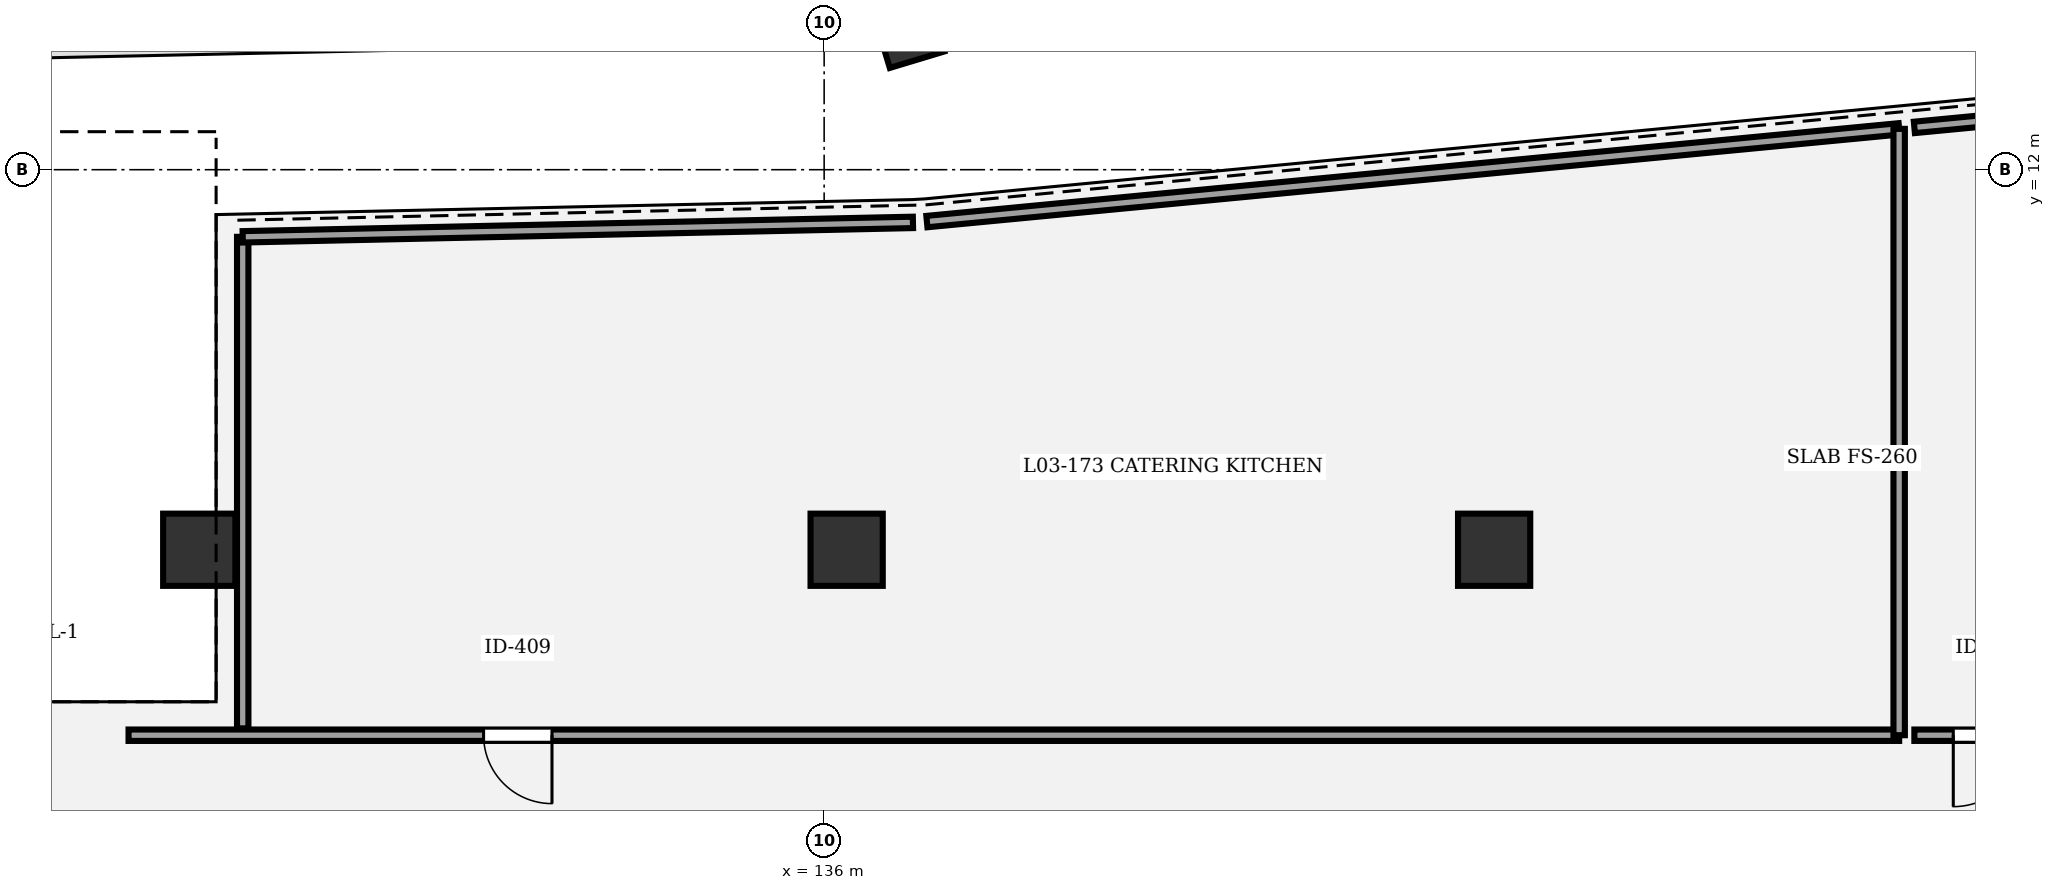
"""IFC4 building model, lengths in metres.
Left out: names, types, materials, properties, quantities, classifications, styles, units other than length and angle.
Written with IfcOpenShell. Run it as: python <this file> out.ifc"""

import sys

from ifc_helpers import new_model, si_unit, direction, frame, frame_2d, origin, origin_2d, place, context, subcontext, project, spatial, rectangle, circle, extrude, element, fill, save


model = new_model("IFC4")
c1 = context("Model", 3, precision=1e-05, world=origin(), true_north=direction((0.0, 1.0)))
c2 = subcontext(c1, "Body", "Model", "MODEL_VIEW")
j1 = project(units=[si_unit("LENGTHUNIT", "METRE"), si_unit("PLANEANGLEUNIT", "RADIAN")], contexts=[c1])
p1 = place(None, origin())
s1 = spatial("IfcSite", under=j1, at=p1, CompositionType="ELEMENT")
p2 = place(p1, origin())
s2 = spatial("IfcBuilding", under=s1, at=p2, CompositionType="ELEMENT")
p3 = place(p2, frame((0.0, 0.0, 14.7)))
s3 = spatial("IfcBuildingStorey", under=s2, at=p3, CompositionType="ELEMENT", Elevation=14.7)
p4 = place(p3, frame((137.115, 13.806, 0.0), z_axis=(0.0, 0.0, 1.0), x_axis=(0.289198876314, -0.957269037387, 0.0)))
e1 = element("IfcColumn", 1, at=p4, inside=s3, PredefinedType="COLUMN", context=c2, shape_type="SweptSolid", body=[
    extrude(rectangle(XDim=0.75, YDim=0.75, at=origin_2d()), origin(), (0.0, 0.0, 1.0), 4.5),
])
for number, where, z_axis, x_axis in (
    (2, (127.778, 7.0, 0.0), (0.0, 0.0, 1.0), (1.0, 0.0, 0.0)),
    (3, (136.296, 7.0, 0.0), (0.0, 0.0, 1.0), (1.0, 0.0, 0.0)),
    (4, (144.815, 7.0, 0.0), (0.0, 0.0, 1.0), (1.0, 0.0, 0.0)),
):
    element("IfcColumn", number, at=place(p3, frame(where, z_axis=z_axis, x_axis=x_axis)), inside=s3, PredefinedType="COLUMN", context=c2, shape_type="SweptSolid", body=[
        extrude(circle(Radius=0.475, at=origin_2d()), origin(), (0.0, 0.0, 1.0), 4.5),
    ])
p5 = place(p3, frame((150.144, 4.56, 0.0), z_axis=(0.0, 0.0, 1.0), x_axis=(-1.0, 0.0, 0.0)))
e5 = element("IfcWall", 5, at=p5, inside=s3, PredefinedType="PARTITIONING", context=c2, shape_type="SweptSolid", body=[
    extrude(rectangle(XDim=23.296, YDim=0.15, at=frame_2d((11.648, 0.0))), origin(), (0.0, 0.0, 1.0), 3.25),
])
p6 = place(p5, frame((17.725, 0.0, 0.0)))
e6 = element("IfcOpeningElement", 6, at=p6, cuts=e5, PredefinedType="OPENING", context=c2, shape_type="SweptSolid", body=[
    extrude(rectangle(XDim=0.9, YDim=2.2, at=frame_2d((0.45, 1.1))), frame((0.0, 0.085, 0.0), z_axis=(0.0, -1.0, 0.0), x_axis=(1.0, 0.0, 0.0)), (0.0, 0.0, 1.0), 0.17),
])
p7 = place(p3, frame((155.764, 4.56, 0.0), z_axis=(0.0, 0.0, 1.0), x_axis=(-1.0, 0.0, 0.0)))
e7 = element("IfcWall", 7, at=p7, inside=s3, PredefinedType="PARTITIONING", context=c2, shape_type="SweptSolid", body=[
    extrude(rectangle(XDim=5.42, YDim=0.15, at=frame_2d((2.71, 0.0))), origin(), (0.0, 0.0, 1.0), 3.25),
])
p8 = place(p7, frame((3.968, 0.0, 0.0)))
e8 = element("IfcOpeningElement", 8, at=p8, cuts=e7, PredefinedType="OPENING", context=c2, shape_type="SweptSolid", body=[
    extrude(rectangle(XDim=0.94, YDim=2.2, at=frame_2d((0.47, 1.1))), frame((0.0, 0.085, 0.0), z_axis=(0.0, -1.0, 0.0), x_axis=(1.0, 0.0, 0.0)), (0.0, 0.0, 1.0), 0.17),
])
p9 = place(p3, frame((128.35, 4.65, 0.0), z_axis=(0.0, 0.0, 1.0), x_axis=(0.0, 1.0, 0.0)))
e9 = element("IfcWall", 9, at=p9, inside=s3, PredefinedType="PARTITIONING", context=c2, shape_type="SweptSolid", body=[
    extrude(rectangle(XDim=6.467, YDim=0.15, at=frame_2d((3.233, 0.0))), origin(), (0.0, 0.0, 1.0), 3.25),
])
p10 = place(p3, frame((128.35, 11.117, 0.0), z_axis=(0.0, 0.0, 1.0), x_axis=(0.999768109674, 0.021534318641, 0.0)))
e10 = element("IfcWall", 10, at=p10, inside=s3, PredefinedType="PARTITIONING", context=c2, shape_type="SweptSolid", body=[
    extrude(rectangle(XDim=8.82, YDim=0.15, at=frame_2d((4.41, 0.0))), origin(), (0.0, 0.0, 1.0), 3.25),
])
p11 = place(p3, frame((137.352, 11.317, 0.0), z_axis=(0.0, 0.0, 1.0), x_axis=(0.995483253835, 0.094937302124, 0.0)))
e11 = element("IfcWall", 11, at=p11, inside=s3, PredefinedType="PARTITIONING", context=c2, shape_type="SweptSolid", body=[
    extrude(rectangle(XDim=12.85, YDim=0.15, at=frame_2d((6.425, 0.0))), origin(), (0.0, 0.0, 1.0), 3.25),
])
p12 = place(p3, frame((150.144, 12.537, 0.0), z_axis=(0.0, 0.0, 1.0), x_axis=(0.0, -1.0, 0.0)))
e12 = element("IfcWall", 12, at=p12, inside=s3, PredefinedType="PARTITIONING", context=c2, shape_type="SweptSolid", body=[
    extrude(rectangle(XDim=7.977, YDim=0.15, at=frame_2d((3.989, 0.0))), origin(), (0.0, 0.0, 1.0), 3.25),
])
p13 = place(p3, frame((150.344, 12.556, 0.0), z_axis=(0.0, 0.0, 1.0), x_axis=(0.995483241572, 0.094937430712, 0.0)))
e13 = element("IfcWall", 13, at=p13, inside=s3, PredefinedType="PARTITIONING", context=c2, shape_type="SweptSolid", body=[
    extrude(rectangle(XDim=1.975, YDim=0.15, at=frame_2d((0.988, 0.0))), origin(), (0.0, 0.0, 1.0), 3.25),
])
p14 = place(p6, origin())
e14 = element("IfcDoor", 14, at=p14, inside=s3, OperationType="SINGLE_SWING_LEFT", PredefinedType="DOOR", context=c2, shape_type="SweptSolid", body=[
    extrude(rectangle(XDim=0.9, YDim=2.2, at=frame_2d((0.45, 1.1))), frame((0.0, 0.025, 0.0), z_axis=(0.0, -1.0, 0.0), x_axis=(1.0, 0.0, 0.0)), (0.0, 0.0, 1.0), 0.05),
])
fill(e6, e14)
p15 = place(p8, origin())
e15 = element("IfcDoor", 15, at=p15, inside=s3, OperationType="SINGLE_SWING_RIGHT", PredefinedType="DOOR", context=c2, shape_type="SweptSolid", body=[
    extrude(rectangle(XDim=0.94, YDim=2.2, at=frame_2d((0.47, 1.1))), frame((0.0, 0.025, 0.0), z_axis=(0.0, -1.0, 0.0), x_axis=(1.0, 0.0, 0.0)), (0.0, 0.0, 1.0), 0.05),
])
fill(e8, e15)
save(model, sys.argv[1])
